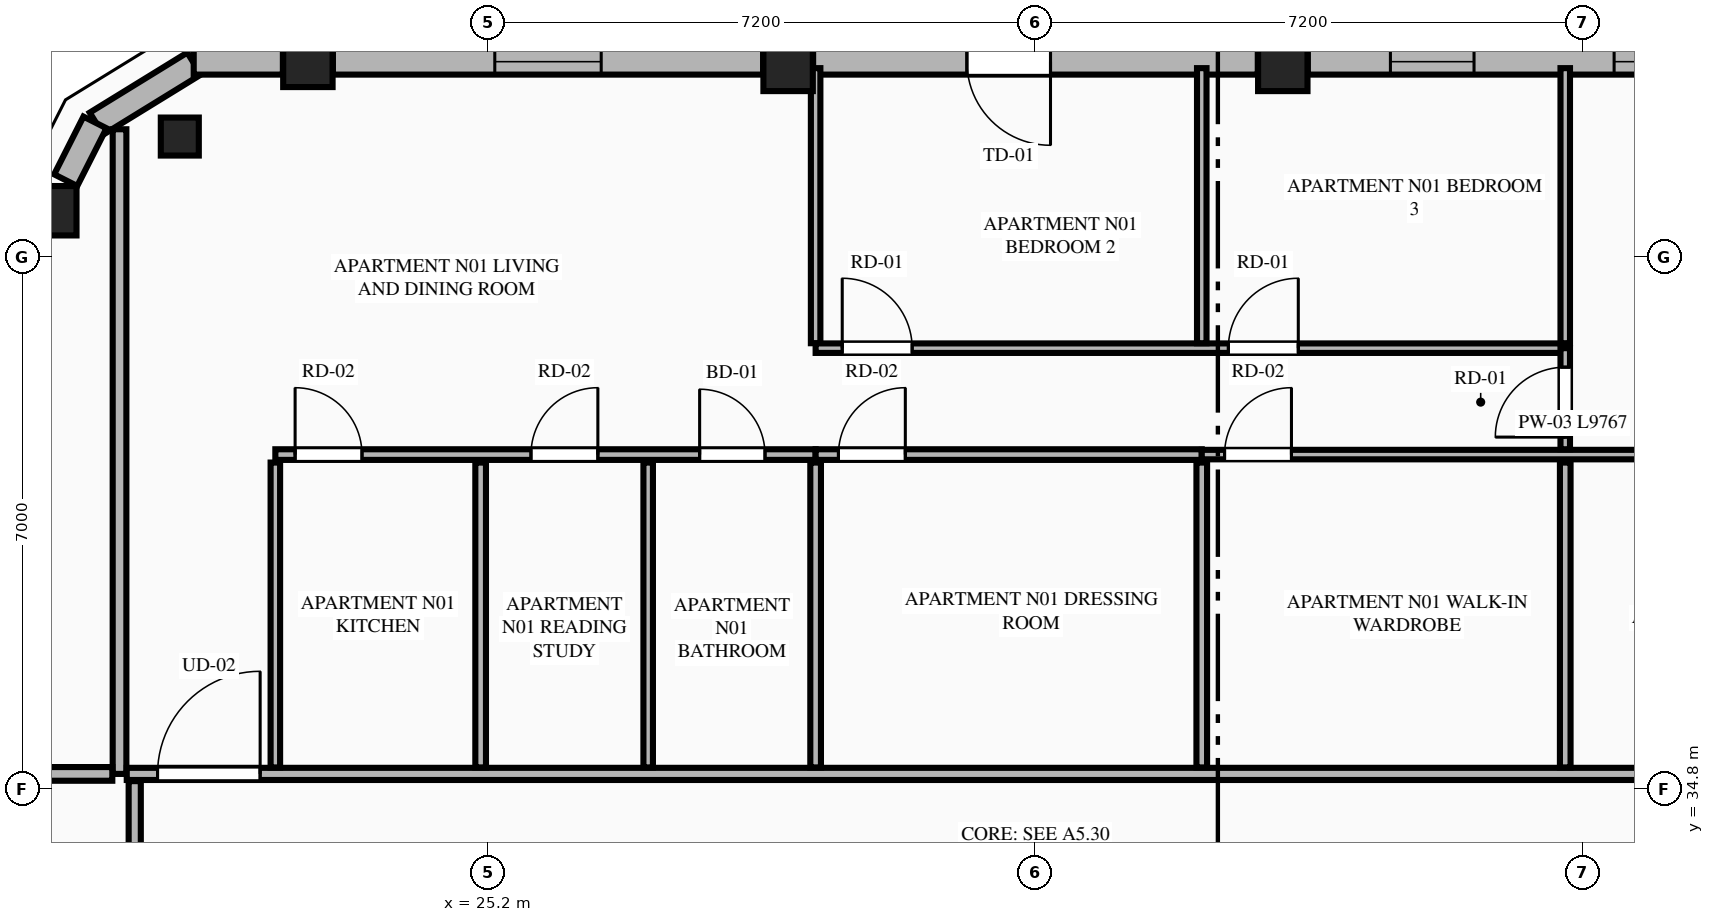
"""IFC4 building model, lengths in metres.
Left out: names, types, materials, properties, quantities, classifications, styles, units other than length and angle.
Written with IfcOpenShell. Run it as: python <this file> out.ifc"""

import sys

from ifc_helpers import new_model, si_unit, direction, frame, frame_2d, origin, origin_2d, place, context, subcontext, project, spatial, rectangle, extrude, element, fill, save


model = new_model("IFC4")
c1 = context("Model", 3, precision=1e-05, world=origin(), true_north=direction((0.0, 1.0)))
c2 = subcontext(c1, "Body", "Model", "MODEL_VIEW")
j1 = project(units=[si_unit("LENGTHUNIT", "METRE"), si_unit("PLANEANGLEUNIT", "RADIAN")], contexts=[c1])
p1 = place(None, origin())
s1 = spatial("IfcSite", under=j1, at=p1, CompositionType="ELEMENT")
p2 = place(p1, origin())
s2 = spatial("IfcBuilding", under=s1, at=p2, CompositionType="ELEMENT")
p3 = place(p2, frame((0.0, 0.0, 267.15)))
s3 = spatial("IfcBuildingStorey", under=s2, at=p3, CompositionType="ELEMENT", Elevation=267.15)
for number, where, z_axis, x_axis in (
    (1, (35.654, 44.308, 0.0), (0.0, 0.0, 1.0), (1.0, 0.0, 0.0)),
    (2, (29.146, 44.308, 0.0), (0.0, 0.0, 1.0), (1.0, 0.0, 0.0)),
    (3, (22.828, 44.361, 0.0), (0.0, 0.0, 1.0), (1.0, 0.0, 0.0)),
    (4, (19.459, 42.409, 0.0), (0.0, 0.0, 1.0), (1.0, 0.0, 0.0)),
):
    element("IfcColumn", number, at=place(p3, frame(where, z_axis=z_axis, x_axis=x_axis)), inside=s3, PredefinedType="COLUMN", context=c2, shape_type="SweptSolid", body=[
        extrude(rectangle(XDim=0.65, YDim=0.65, at=origin_2d()), origin(), (0.0, 0.0, 1.0), 3.65),
    ])
p4 = place(p3, frame((21.143, 43.385, 0.0), z_axis=(0.0, 0.0, 1.0), x_axis=(-0.865256437757, -0.501329529272, 0.0)))
e5 = element("IfcColumn", 5, at=p4, inside=s3, PredefinedType="PILASTER", context=c2, shape_type="SweptSolid", body=[
    extrude(rectangle(XDim=0.5, YDim=0.35, at=origin_2d()), origin(), (0.0, 0.0, 1.0), 3.65),
])
p5 = place(p3, frame((21.331, 44.345, 0.0), z_axis=(0.0, 0.0, 1.0), x_axis=(-0.851680557619, -0.52406128246, 0.0)))
e6 = element("IfcWall", 6, at=p5, inside=s3, PredefinedType="STANDARD", context=c2, shape_type="SweptSolid", body=[
    extrude(rectangle(XDim=1.508, YDim=0.34, at=frame_2d((0.754, 0.0))), origin(), (0.0, 0.0, 1.0), 3.45),
])
p6 = place(p3, frame((41.643, 44.37, 0.0), z_axis=(0.0, 0.0, 1.0), x_axis=(-1.0, 0.0, 0.0)))
e7 = element("IfcWall", 7, at=p6, inside=s3, PredefinedType="STANDARD", context=c2, shape_type="SweptSolid", body=[
    extrude(rectangle(XDim=5.66, YDim=0.34, at=frame_2d((2.83, 0.0))), origin(), (0.0, 0.0, 1.0), 2.983),
])
p7 = place(p6, frame((0.53, 0.0, 0.75)))
e8 = element("IfcOpeningElement", 8, at=p7, cuts=e7, PredefinedType="OPENING", context=c2, shape_type="SweptSolid", body=[
    extrude(rectangle(XDim=1.1, YDim=2.0, at=frame_2d((0.55, 1.0))), frame((0.0, 0.18, 0.0), z_axis=(0.0, -1.0, 0.0), x_axis=(1.0, 0.0, 0.0)), (0.0, 0.0, 1.0), 0.36),
])
p8 = place(p6, frame((3.473, 0.0, 0.75)))
e9 = element("IfcOpeningElement", 9, at=p8, cuts=e7, PredefinedType="OPENING", context=c2, shape_type="SweptSolid", body=[
    extrude(rectangle(XDim=1.1, YDim=2.0, at=frame_2d((0.55, 1.0))), frame((0.0, 0.18, 0.0), z_axis=(0.0, -1.0, 0.0), x_axis=(1.0, 0.0, 0.0)), (0.0, 0.0, 1.0), 0.36),
])
p9 = place(p3, frame((35.325, 44.37, 0.0), z_axis=(0.0, 0.0, 1.0), x_axis=(-1.0, 0.0, 0.0)))
e10 = element("IfcWall", 10, at=p9, inside=s3, PredefinedType="STANDARD", context=c2, shape_type="SweptSolid", body=[
    extrude(rectangle(XDim=5.85, YDim=0.34, at=frame_2d((2.925, 0.0))), origin(), (0.0, 0.0, 1.0), 2.983),
])
p10 = place(p9, frame((2.727, 0.0, 0.0)))
e11 = element("IfcOpeningElement", 11, at=p10, cuts=e10, PredefinedType="OPENING", context=c2, shape_type="SweptSolid", body=[
    extrude(rectangle(XDim=1.1, YDim=2.25, at=frame_2d((0.55, 1.125))), frame((0.0, 0.18, 0.0), z_axis=(0.0, -1.0, 0.0), x_axis=(1.0, 0.0, 0.0)), (0.0, 0.0, 1.0), 0.36),
])
p11 = place(p3, frame((28.817, 44.37, 0.0), z_axis=(0.0, 0.0, 1.0), x_axis=(-1.0, 0.0, 0.0)))
e12 = element("IfcWall", 12, at=p11, inside=s3, PredefinedType="STANDARD", context=c2, shape_type="SweptSolid", body=[
    extrude(rectangle(XDim=5.66, YDim=0.34, at=frame_2d((2.83, 0.0))), origin(), (0.0, 0.0, 1.0), 2.983),
])
p12 = place(p11, frame((2.13, 0.0, 0.75)))
e13 = element("IfcOpeningElement", 13, at=p12, cuts=e12, PredefinedType="OPENING", context=c2, shape_type="SweptSolid", body=[
    extrude(rectangle(XDim=1.4, YDim=2.05, at=frame_2d((0.7, 1.025))), frame((0.0, 0.18, 0.0), z_axis=(0.0, -1.0, 0.0), x_axis=(1.0, 0.0, 0.0)), (0.0, 0.0, 1.0), 0.36),
])
p13 = place(p3, frame((22.499, 44.37, 0.0), z_axis=(0.0, 0.0, 1.0), x_axis=(-1.0, 0.0, 0.0)))
e14 = element("IfcWall", 14, at=p13, inside=s3, PredefinedType="STANDARD", context=c2, shape_type="SweptSolid", body=[
    extrude(rectangle(XDim=1.173, YDim=0.34, at=frame_2d((0.586, 0.0))), origin(), (0.0, 0.0, 1.0), 3.45),
])
p14 = place(p3, frame((20.027, 43.571, 0.0), z_axis=(0.0, 0.0, 1.0), x_axis=(-0.451907025977, -0.8920650424, 0.0)))
e15 = element("IfcWall", 15, at=p14, inside=s3, PredefinedType="STANDARD", context=c2, shape_type="SweptSolid", body=[
    extrude(rectangle(XDim=0.852, YDim=0.34, at=frame_2d((0.426, 0.0))), origin(), (0.0, 0.0, 1.0), 3.45),
])
p15 = place(p3, frame((20.35, 35.0, 0.0), z_axis=(0.0, 0.0, 1.0), x_axis=(0.0, 1.0, 0.0)))
e16 = element("IfcWall", 16, at=p15, inside=s3, PredefinedType="PARTITIONING", context=c2, shape_type="SweptSolid", body=[
    extrude(rectangle(XDim=8.481, YDim=0.18, at=frame_2d((4.24, 0.0))), origin(), (0.0, 0.0, 1.0), 3.45),
])
p16 = place(p3, frame((20.445, 35.0, 0.0), z_axis=(0.0, 0.0, 1.0), x_axis=(1.0, 0.0, 0.0)))
e17 = element("IfcWall", 17, at=p16, inside=s3, PredefinedType="PARTITIONING", context=c2, shape_type="SweptSolid", body=[
    extrude(rectangle(XDim=23.91, YDim=0.16, at=frame_2d((11.955, 0.0))), origin(), (0.0, 0.0, 1.0), 3.45),
])
p17 = place(p16, frame((0.405, 0.0, 0.0)))
e18 = element("IfcOpeningElement", 18, at=p17, cuts=e17, PredefinedType="OPENING", context=c2, shape_type="SweptSolid", body=[
    extrude(rectangle(XDim=1.35, YDim=2.35, at=frame_2d((0.675, 1.175))), frame((0.0, 0.09, 0.0), z_axis=(0.0, -1.0, 0.0), x_axis=(1.0, 0.0, 0.0)), (0.0, 0.0, 1.0), 0.18),
])
p18 = place(p3, frame((22.4, 35.085, 0.0), z_axis=(0.0, 0.0, 1.0), x_axis=(0.0, 1.0, 0.0)))
e19 = element("IfcWall", 19, at=p18, inside=s3, PredefinedType="PARTITIONING", context=c2, shape_type="SweptSolid", body=[
    extrude(rectangle(XDim=4.011, YDim=0.125, at=frame_2d((2.005, 0.0))), origin(), (0.0, 0.0, 1.0), 3.45),
])
p19 = place(p3, frame((22.4, 39.201, 0.0), z_axis=(0.0, 0.0, 1.0), x_axis=(1.0, 0.0, 0.0)))
e20 = element("IfcWall", 20, at=p19, inside=s3, PredefinedType="PLUMBINGWALL", context=c2, shape_type="SweptSolid", body=[
    extrude(rectangle(XDim=7.108, YDim=0.14, at=frame_2d((3.554, 0.0))), origin(), (0.0, 0.0, 1.0), 3.45),
])
p20 = place(p19, frame((5.582, 0.0, 0.0)))
e21 = element("IfcOpeningElement", 21, at=p20, cuts=e20, PredefinedType="OPENING", context=c2, shape_type="SweptSolid", body=[
    extrude(rectangle(XDim=0.86, YDim=2.1, at=frame_2d((0.43, 1.05))), frame((0.0, 0.08, 0.0), z_axis=(0.0, -1.0, 0.0), x_axis=(1.0, 0.0, 0.0)), (0.0, 0.0, 1.0), 0.16),
])
p21 = place(p19, frame((0.26, 0.0, 0.0)))
e22 = element("IfcOpeningElement", 22, at=p21, cuts=e20, PredefinedType="OPENING", context=c2, shape_type="SweptSolid", body=[
    extrude(rectangle(XDim=0.88, YDim=2.15, at=frame_2d((0.44, 1.075))), frame((0.0, 0.08, 0.0), z_axis=(0.0, -1.0, 0.0), x_axis=(1.0, 0.0, 0.0)), (0.0, 0.0, 1.0), 0.16),
])
p22 = place(p19, frame((3.363, 0.0, 0.0)))
e23 = element("IfcOpeningElement", 23, at=p22, cuts=e20, PredefinedType="OPENING", context=c2, shape_type="SweptSolid", body=[
    extrude(rectangle(XDim=0.88, YDim=2.15, at=frame_2d((0.44, 1.075))), frame((0.0, 0.08, 0.0), z_axis=(0.0, -1.0, 0.0), x_axis=(1.0, 0.0, 0.0)), (0.0, 0.0, 1.0), 0.16),
])
p23 = place(p3, frame((29.508, 39.201, 0.0), z_axis=(0.0, 0.0, 1.0), x_axis=(1.0, 0.0, 0.0)))
e24 = element("IfcWall", 24, at=p23, inside=s3, PredefinedType="PLUMBINGWALL", context=c2, shape_type="SweptSolid", body=[
    extrude(rectangle(XDim=5.08, YDim=0.14, at=frame_2d((2.54, 0.0))), origin(), (0.0, 0.0, 1.0), 3.45),
])
p24 = place(p23, frame((0.3, 0.0, 0.0)))
e25 = element("IfcOpeningElement", 25, at=p24, cuts=e24, PredefinedType="OPENING", context=c2, shape_type="SweptSolid", body=[
    extrude(rectangle(XDim=0.88, YDim=2.15, at=frame_2d((0.44, 1.075))), frame((0.0, 0.08, 0.0), z_axis=(0.0, -1.0, 0.0), x_axis=(1.0, 0.0, 0.0)), (0.0, 0.0, 1.0), 0.16),
])
p25 = place(p3, frame((34.588, 39.201, 0.0), z_axis=(0.0, 0.0, 1.0), x_axis=(1.0, 0.0, 0.0)))
e26 = element("IfcWall", 26, at=p25, inside=s3, PredefinedType="PARTITIONING", context=c2, shape_type="SweptSolid", body=[
    extrude(rectangle(XDim=9.767, YDim=0.125, at=frame_2d((4.884, 0.0))), origin(), (0.0, 0.0, 1.0), 3.45),
])
p26 = place(p25, frame((6.849, 0.0, 0.0)))
e27 = element("IfcOpeningElement", 27, at=p26, cuts=e26, PredefinedType="OPENING", context=c2, shape_type="SweptSolid", body=[
    extrude(rectangle(XDim=0.86, YDim=2.1, at=frame_2d((0.43, 1.05))), frame((0.0, 0.073, 0.0), z_axis=(0.0, -1.0, 0.0), x_axis=(1.0, 0.0, 0.0)), (0.0, 0.0, 1.0), 0.145),
])
p27 = place(p25, frame((0.3, 0.0, 0.0)))
e28 = element("IfcOpeningElement", 28, at=p27, cuts=e26, PredefinedType="OPENING", context=c2, shape_type="SweptSolid", body=[
    extrude(rectangle(XDim=0.88, YDim=2.15, at=frame_2d((0.44, 1.075))), frame((0.0, 0.073, 0.0), z_axis=(0.0, -1.0, 0.0), x_axis=(1.0, 0.0, 0.0)), (0.0, 0.0, 1.0), 0.145),
])
p28 = place(p3, frame((25.101, 35.085, 0.0), z_axis=(0.0, 0.0, 1.0), x_axis=(0.0, 1.0, 0.0)))
e29 = element("IfcWall", 29, at=p28, inside=s3, PredefinedType="PLUMBINGWALL", context=c2, shape_type="SweptSolid", body=[
    extrude(rectangle(XDim=4.011, YDim=0.14, at=frame_2d((2.005, 0.0))), origin(), (0.0, 0.0, 1.0), 3.45),
])
p29 = place(p3, frame((27.305, 35.085, 0.0), z_axis=(0.0, 0.0, 1.0), x_axis=(0.0, 1.0, 0.0)))
e30 = element("IfcWall", 30, at=p29, inside=s3, PredefinedType="PARTITIONING", context=c2, shape_type="SweptSolid", body=[
    extrude(rectangle(XDim=4.011, YDim=0.125, at=frame_2d((2.005, 0.0))), origin(), (0.0, 0.0, 1.0), 3.45),
])
p30 = place(p3, frame((29.508, 40.666, 0.0), z_axis=(0.0, 0.0, 1.0), x_axis=(0.0, 1.0, 0.0)))
e31 = element("IfcWall", 31, at=p30, inside=s3, PredefinedType="PARTITIONING", context=c2, shape_type="SweptSolid", body=[
    extrude(rectangle(XDim=3.619, YDim=0.125, at=frame_2d((1.81, 0.0))), origin(), (0.0, 0.0, 1.0), 3.45),
])
p31 = place(p3, frame((29.508, 40.601, 0.0), z_axis=(0.0, 0.0, 1.0), x_axis=(1.0, 0.0, 0.0)))
e32 = element("IfcWall", 32, at=p31, inside=s3, PredefinedType="PARTITIONING", context=c2, shape_type="SweptSolid", body=[
    extrude(rectangle(XDim=9.862, YDim=0.125, at=frame_2d((4.931, 0.0))), origin(), (0.0, 0.0, 1.0), 3.45),
])
p32 = place(p31, frame((0.35, 0.0, 0.0)))
e33 = element("IfcOpeningElement", 33, at=p32, cuts=e32, PredefinedType="OPENING", context=c2, shape_type="SweptSolid", body=[
    extrude(rectangle(XDim=0.92, YDim=2.15, at=frame_2d((0.46, 1.075))), frame((0.0, 0.073, 0.0), z_axis=(0.0, -1.0, 0.0), x_axis=(1.0, 0.0, 0.0)), (0.0, 0.0, 1.0), 0.145),
])
p33 = place(p31, frame((5.43, 0.0, 0.0)))
e34 = element("IfcOpeningElement", 34, at=p33, cuts=e32, PredefinedType="OPENING", context=c2, shape_type="SweptSolid", body=[
    extrude(rectangle(XDim=0.92, YDim=2.15, at=frame_2d((0.46, 1.075))), frame((0.0, 0.073, 0.0), z_axis=(0.0, -1.0, 0.0), x_axis=(1.0, 0.0, 0.0)), (0.0, 0.0, 1.0), 0.145),
])
p34 = place(p3, frame((39.37, 39.271, 0.0), z_axis=(0.0, 0.0, 1.0), x_axis=(0.0, 1.0, 0.0)))
e35 = element("IfcWall", 35, at=p34, inside=s3, PredefinedType="PARTITIONING", context=c2, shape_type="SweptSolid", body=[
    extrude(rectangle(XDim=1.33, YDim=0.125, at=frame_2d((0.665, 0.0))), origin(), (0.0, 0.0, 1.0), 3.45),
])
p35 = place(p34, frame((0.16, 0.0, 0.0)))
e36 = element("IfcOpeningElement", 36, at=p35, cuts=e35, PredefinedType="OPENING", context=c2, shape_type="SweptSolid", body=[
    extrude(rectangle(XDim=0.92, YDim=2.15, at=frame_2d((0.46, 1.075))), frame((0.0, 0.073, 0.0), z_axis=(0.0, -1.0, 0.0), x_axis=(1.0, 0.0, 0.0)), (0.0, 0.0, 1.0), 0.145),
])
for number, where, z_axis, x_axis in (
    (37, (29.508, 35.085, 0.0), (0.0, 0.0, 1.0), (0.0, 1.0, 0.0)),
    (38, (34.588, 35.085, 0.0), (0.0, 0.0, 1.0), (0.0, 1.0, 0.0)),
):
    element("IfcWall", number, at=place(p3, frame(where, z_axis=z_axis, x_axis=x_axis)), inside=s3, PredefinedType="PLUMBINGWALL", context=c2, shape_type="SweptSolid", body=[
        extrude(rectangle(XDim=4.011, YDim=0.14, at=frame_2d((2.005, 0.0))), origin(), (0.0, 0.0, 1.0), 3.45),
    ])
for number, where, z_axis, x_axis in (
    (39, (34.588, 40.666, 0.0), (0.0, 0.0, 1.0), (0.0, 1.0, 0.0)),
    (40, (39.37, 40.666, 0.0), (0.0, 0.0, 1.0), (0.0, 1.0, 0.0)),
):
    element("IfcWall", number, at=place(p3, frame(where, z_axis=z_axis, x_axis=x_axis)), inside=s3, PredefinedType="PARTITIONING", context=c2, shape_type="SweptSolid", body=[
        extrude(rectangle(XDim=3.619, YDim=0.125, at=frame_2d((1.81, 0.0))), origin(), (0.0, 0.0, 1.0), 3.45),
    ])
p36 = place(p3, frame((39.37, 35.085, 0.0), z_axis=(0.0, 0.0, 1.0), x_axis=(0.0, 1.0, 0.0)))
e41 = element("IfcWall", 41, at=p36, inside=s3, PredefinedType="PLUMBINGWALL", context=c2, shape_type="SweptSolid", body=[
    extrude(rectangle(XDim=4.011, YDim=0.14, at=frame_2d((2.005, 0.0))), origin(), (0.0, 0.0, 1.0), 3.45),
])
p37 = place(p3, frame((15.933, 35.0, 0.0), z_axis=(0.0, 0.0, 1.0), x_axis=(1.0, 0.0, 0.0)))
e42 = element("IfcWall", 42, at=p37, inside=s3, PredefinedType="PARTITIONING", context=c2, shape_type="SweptSolid", body=[
    extrude(rectangle(XDim=4.322, YDim=0.18, at=frame_2d((2.161, 0.0))), origin(), (0.0, 0.0, 1.0), 3.45),
])
p38 = place(p3, frame((20.55, 16.495, 0.0), z_axis=(0.0, 0.0, 1.0), x_axis=(0.0, 1.0, 0.0)))
e43 = element("IfcWall", 43, at=p38, inside=s3, PredefinedType="PARTITIONING", context=c2, shape_type="SweptSolid", body=[
    extrude(rectangle(XDim=18.41, YDim=0.16, at=frame_2d((9.205, 0.0))), origin(), (0.0, 0.0, 1.0), 3.137),
])
p39 = place(p38, frame((0.4, 0.0, 0.0)))
e44 = element("IfcOpeningElement", 44, at=p39, cuts=e43, PredefinedType="OPENING", context=c2, shape_type="SweptSolid", body=[
    extrude(rectangle(XDim=1.02, YDim=2.25, at=frame_2d((0.51, 1.125))), frame((0.0, 0.09, 0.0), z_axis=(0.0, -1.0, 0.0), x_axis=(1.0, 0.0, 0.0)), (0.0, 0.0, 1.0), 0.18),
])
p40 = place(p7, origin())
e45 = element("IfcWindow", 45, at=p40, inside=s3, PartitioningType="SINGLE_PANEL", PredefinedType="WINDOW", context=c2, shape_type="SweptSolid", body=[
    extrude(rectangle(XDim=1.1, YDim=2.0, at=frame_2d((0.55, 1.0))), frame((0.0, 0.03, 0.0), z_axis=(0.0, -1.0, 0.0), x_axis=(1.0, 0.0, 0.0)), (0.0, 0.0, 1.0), 0.06),
])
fill(e8, e45)
p41 = place(p10, origin())
e46 = element("IfcDoor", 46, at=p41, inside=s3, OperationType="SINGLE_SWING_LEFT", PredefinedType="DOOR", context=c2, shape_type="SweptSolid", body=[
    extrude(rectangle(XDim=1.1, YDim=2.25, at=frame_2d((0.55, 1.125))), frame((0.0, 0.025, 0.0), z_axis=(0.0, -1.0, 0.0), x_axis=(1.0, 0.0, 0.0)), (0.0, 0.0, 1.0), 0.05),
])
fill(e11, e46)
p42 = place(p12, origin())
e47 = element("IfcWindow", 47, at=p42, inside=s3, PartitioningType="SINGLE_PANEL", PredefinedType="WINDOW", context=c2, shape_type="SweptSolid", body=[
    extrude(rectangle(XDim=1.4, YDim=2.05, at=frame_2d((0.7, 1.025))), frame((0.0, 0.03, 0.0), z_axis=(0.0, -1.0, 0.0), x_axis=(1.0, 0.0, 0.0)), (0.0, 0.0, 1.0), 0.06),
])
fill(e13, e47)
p43 = place(p20, origin())
e48 = element("IfcDoor", 48, at=p43, inside=s3, OperationType="SINGLE_SWING_LEFT", PredefinedType="DOOR", context=c2, shape_type="SweptSolid", body=[
    extrude(rectangle(XDim=0.86, YDim=2.1, at=frame_2d((0.43, 1.05))), frame((0.0, 0.025, 0.0), z_axis=(0.0, -1.0, 0.0), x_axis=(1.0, 0.0, 0.0)), (0.0, 0.0, 1.0), 0.05),
])
fill(e21, e48)
p44 = place(p17, origin())
e49 = element("IfcDoor", 49, at=p44, inside=s3, OperationType="SINGLE_SWING_RIGHT", PredefinedType="DOOR", context=c2, shape_type="SweptSolid", body=[
    extrude(rectangle(XDim=1.35, YDim=2.35, at=frame_2d((0.675, 1.175))), frame((0.0, 0.025, 0.0), z_axis=(0.0, -1.0, 0.0), x_axis=(1.0, 0.0, 0.0)), (0.0, 0.0, 1.0), 0.05),
])
fill(e18, e49)
p45 = place(p21, origin())
e50 = element("IfcDoor", 50, at=p45, inside=s3, OperationType="SINGLE_SWING_LEFT", PredefinedType="DOOR", context=c2, shape_type="SweptSolid", body=[
    extrude(rectangle(XDim=0.88, YDim=2.15, at=frame_2d((0.44, 1.075))), frame((0.0, 0.025, 0.0), z_axis=(0.0, -1.0, 0.0), x_axis=(1.0, 0.0, 0.0)), (0.0, 0.0, 1.0), 0.05),
])
fill(e22, e50)
p46 = place(p22, origin())
e51 = element("IfcDoor", 51, at=p46, inside=s3, OperationType="SINGLE_SWING_RIGHT", PredefinedType="DOOR", context=c2, shape_type="SweptSolid", body=[
    extrude(rectangle(XDim=0.88, YDim=2.15, at=frame_2d((0.44, 1.075))), frame((0.0, 0.025, 0.0), z_axis=(0.0, -1.0, 0.0), x_axis=(1.0, 0.0, 0.0)), (0.0, 0.0, 1.0), 0.05),
])
fill(e23, e51)
p47 = place(p24, origin())
e52 = element("IfcDoor", 52, at=p47, inside=s3, OperationType="SINGLE_SWING_RIGHT", PredefinedType="DOOR", context=c2, shape_type="SweptSolid", body=[
    extrude(rectangle(XDim=0.88, YDim=2.15, at=frame_2d((0.44, 1.075))), frame((0.0, 0.025, 0.0), z_axis=(0.0, -1.0, 0.0), x_axis=(1.0, 0.0, 0.0)), (0.0, 0.0, 1.0), 0.05),
])
fill(e25, e52)
p48 = place(p32, origin())
e53 = element("IfcDoor", 53, at=p48, inside=s3, OperationType="SINGLE_SWING_LEFT", PredefinedType="DOOR", context=c2, shape_type="SweptSolid", body=[
    extrude(rectangle(XDim=0.92, YDim=2.15, at=frame_2d((0.46, 1.075))), frame((0.0, 0.025, 0.0), z_axis=(0.0, -1.0, 0.0), x_axis=(1.0, 0.0, 0.0)), (0.0, 0.0, 1.0), 0.05),
])
fill(e33, e53)
p49 = place(p33, origin())
e54 = element("IfcDoor", 54, at=p49, inside=s3, OperationType="SINGLE_SWING_RIGHT", PredefinedType="DOOR", context=c2, shape_type="SweptSolid", body=[
    extrude(rectangle(XDim=0.92, YDim=2.15, at=frame_2d((0.46, 1.075))), frame((0.0, 0.025, 0.0), z_axis=(0.0, -1.0, 0.0), x_axis=(1.0, 0.0, 0.0)), (0.0, 0.0, 1.0), 0.05),
])
fill(e34, e54)
p50 = place(p35, origin())
e55 = element("IfcDoor", 55, at=p50, inside=s3, OperationType="SINGLE_SWING_LEFT", PredefinedType="DOOR", context=c2, shape_type="SweptSolid", body=[
    extrude(rectangle(XDim=0.92, YDim=2.15, at=frame_2d((0.46, 1.075))), frame((0.0, 0.025, 0.0), z_axis=(0.0, -1.0, 0.0), x_axis=(1.0, 0.0, 0.0)), (0.0, 0.0, 1.0), 0.05),
])
fill(e36, e55)
p51 = place(p27, origin())
e56 = element("IfcDoor", 56, at=p51, inside=s3, OperationType="SINGLE_SWING_RIGHT", PredefinedType="DOOR", context=c2, shape_type="SweptSolid", body=[
    extrude(rectangle(XDim=0.88, YDim=2.15, at=frame_2d((0.44, 1.075))), frame((0.0, 0.025, 0.0), z_axis=(0.0, -1.0, 0.0), x_axis=(1.0, 0.0, 0.0)), (0.0, 0.0, 1.0), 0.05),
])
fill(e28, e56)
p52 = place(p8, origin())
e57 = element("IfcWindow", 57, at=p52, inside=s3, PartitioningType="SINGLE_PANEL", PredefinedType="WINDOW", context=c2, shape_type="SweptSolid", body=[
    extrude(rectangle(XDim=1.1, YDim=2.0, at=frame_2d((0.55, 1.0))), frame((0.0, 0.03, 0.0), z_axis=(0.0, -1.0, 0.0), x_axis=(1.0, 0.0, 0.0)), (0.0, 0.0, 1.0), 0.06),
])
fill(e9, e57)
save(model, sys.argv[1])
